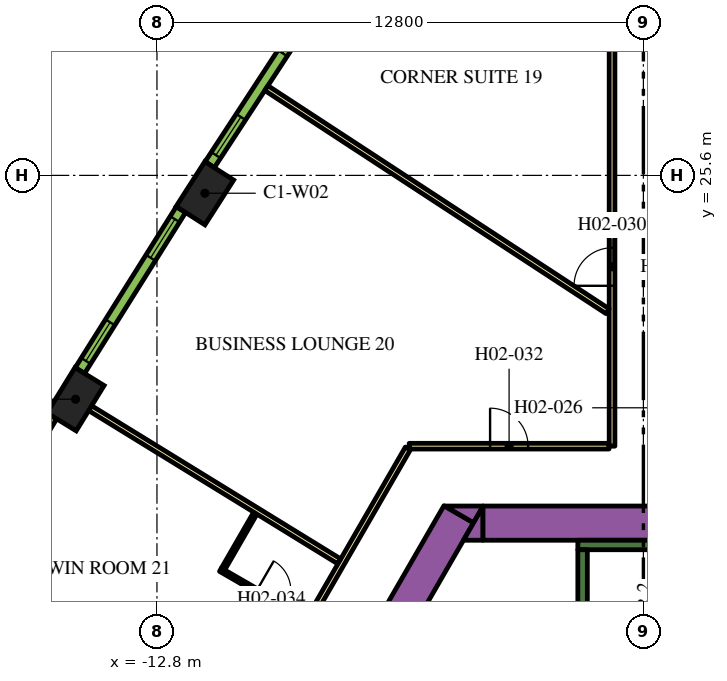
"""IFC4 building model, lengths in metres.
Left out: names, types, materials, properties, quantities, classifications, styles, units other than length and angle.
Written with IfcOpenShell. Run it as: python <this file> out.ifc"""

import sys

from ifc_helpers import new_model, si_unit, direction, frame, frame_2d, origin, origin_2d, place, context, subcontext, project, spatial, polyline, rectangle, outline, extrude, element, fill, save


model = new_model("IFC4")
c1 = context("Model", 3, precision=1e-05, world=origin(), true_north=direction((0.0, 1.0)))
c2 = subcontext(c1, "Body", "Model", "MODEL_VIEW")
j1 = project(units=[si_unit("LENGTHUNIT", "METRE"), si_unit("PLANEANGLEUNIT", "RADIAN")], contexts=[c1])
p1 = place(None, origin())
s1 = spatial("IfcSite", under=j1, at=p1, CompositionType="ELEMENT")
p2 = place(p1, origin())
s2 = spatial("IfcBuilding", under=s1, at=p2, CompositionType="ELEMENT")
p3 = place(p2, frame((0.0, 0.0, 39.3)))
s3 = spatial("IfcBuildingStorey", under=s2, at=p3, CompositionType="ELEMENT", Elevation=39.3)
for number, where, z_axis, x_axis in (
    (1, (-11.539, 25.131, 0.0), (0.0, 0.0, 1.0), (-0.539, -0.842, 0.0)),
    (2, (-14.942, 19.71, 0.0), (0.0, 0.0, 1.0), (-0.524, -0.852, 0.0)),
):
    element("IfcColumn", number, at=place(p3, frame(where, z_axis=z_axis, x_axis=x_axis)), inside=s3, PredefinedType="COLUMN", context=c2, shape_type="SweptSolid", body=[
        extrude(rectangle(XDim=1.4, YDim=0.9, at=origin_2d()), origin(), (0.0, 0.0, 1.0), 3.9),
    ])
p4 = place(p3, frame((-15.36, -1.503, 0.0), z_axis=(0.0, 0.0, 1.0), x_axis=(0.50000389221, 0.866023156604, 0.0)))
e3 = element("IfcWall", 3, at=p4, inside=s3, PredefinedType="SOLIDWALL", context=c2, shape_type="SweptSolid", body=[
    extrude(rectangle(XDim=21.0, YDim=0.9, at=frame_2d((10.5, 0.0))), origin(), (0.0, 0.0, 1.0), 3.9),
])
p5 = place(p3, origin())
e4 = element("IfcWall", 4, at=p5, inside=s3, PredefinedType="SOLIDWALL", context=c2, shape_type="SweptSolid", body=[
    extrude(outline(polyline([(-4.215, 16.9), (-4.469, 16.46), (-5.231, 16.9), (-4.215, 16.9)])), origin(), (0.0, 0.0, 1.0), 3.9),
])
p6 = place(p3, frame((-4.224, 16.45, 0.0), z_axis=(0.0, 0.0, 1.0), x_axis=(1.0, 0.0, 0.0)))
e5 = element("IfcWall", 5, at=p6, inside=s3, PredefinedType="SOLIDWALL", context=c2, shape_type="SweptSolid", body=[
    extrude(rectangle(XDim=9.488, YDim=0.9, at=frame_2d((4.744, 0.0))), origin(), (0.0, 0.0, 1.0), 3.9),
])
e6 = element("IfcWall", 6, at=p5, inside=s3, PredefinedType="SOLIDWALL", context=c2, shape_type="SweptSolid", body=[
    extrude(outline(polyline([(-4.734, 16.0), (-4.226, 16.88), (-4.226, 16.0), (-4.734, 16.0)])), origin(), (0.0, 0.0, 1.0), 3.9),
])
p7 = place(p3, frame((-1.725, 15.875, 0.0), z_axis=(0.0, 0.0, 1.0), x_axis=(1.0, 0.0, 0.0)))
e7 = element("IfcWall", 7, at=p7, inside=s3, PredefinedType="SOLIDWALL", context=c2, shape_type="SweptSolid", body=[
    extrude(rectangle(XDim=3.45, YDim=0.25, at=frame_2d((1.725, 0.0))), origin(), (0.0, 0.0, 1.0), 3.9),
])
p8 = place(p3, frame((-1.6, 8.7, 0.0), z_axis=(0.0, 0.0, 1.0), x_axis=(0.0, 1.0, 0.0)))
e8 = element("IfcWall", 8, at=p8, inside=s3, PredefinedType="SOLIDWALL", context=c2, shape_type="SweptSolid", body=[
    extrude(rectangle(XDim=7.05, YDim=0.25, at=frame_2d((3.525, 0.0))), origin(), (0.0, 0.0, 1.0), 3.9),
])
p9 = place(p3, frame((-0.825, 18.475, 0.0), z_axis=(0.0, 0.0, 1.0), x_axis=(0.0, 1.0, 0.0)))
e9 = element("IfcWall", 9, at=p9, inside=s3, PredefinedType="PARTITIONING", context=c2, shape_type="SweptSolid", body=[
    extrude(rectangle(XDim=16.224, YDim=0.15, at=frame_2d((8.112, 0.0))), origin(), (0.0, 0.0, 1.0), 2.75),
])
p10 = place(p9, frame((4.22, 0.0, 0.0)))
e10 = element("IfcOpeningElement", 10, at=p10, cuts=e9, PredefinedType="OPENING", context=c2, shape_type="SweptSolid", body=[
    extrude(rectangle(XDim=1.0, YDim=2.1, at=frame_2d((0.5, 1.05))), frame((0.0, 0.085, 0.0), z_axis=(0.0, -1.0, 0.0), x_axis=(1.0, 0.0, 0.0)), (0.0, 0.0, 1.0), 0.17),
])
p11 = place(p3, frame((-6.163, 18.475, 0.0), z_axis=(0.0, 0.0, 1.0), x_axis=(1.0, 0.0, 0.0)))
e11 = element("IfcWall", 11, at=p11, inside=s3, PredefinedType="PARTITIONING", context=c2, shape_type="SweptSolid", body=[
    extrude(rectangle(XDim=5.258, YDim=0.15, at=frame_2d((2.629, 0.0))), origin(), (0.0, 0.0, 1.0), 2.75),
])
p12 = place(p11, frame((2.129, 0.0, 0.0)))
e12 = element("IfcOpeningElement", 12, at=p12, cuts=e11, PredefinedType="OPENING", context=c2, shape_type="SweptSolid", body=[
    extrude(rectangle(XDim=1.0, YDim=2.1, at=frame_2d((0.5, 1.05))), frame((0.0, 0.085, 0.0), z_axis=(0.0, -1.0, 0.0), x_axis=(1.0, 0.0, 0.0)), (0.0, 0.0, 1.0), 0.17),
])
p13 = place(p3, frame((-19.081, -3.9, 0.0), z_axis=(0.0, 0.0, 1.0), x_axis=(0.499998313975, 0.866026377209, 0.0)))
e13 = element("IfcWall", 13, at=p13, inside=s3, PredefinedType="PARTITIONING", context=c2, shape_type="SweptSolid", body=[
    extrude(rectangle(XDim=25.766, YDim=0.15, at=frame_2d((12.883, 0.0))), origin(), (0.0, 0.0, 1.0), 2.75),
])
p14 = place(p13, frame((16.196, 0.0, 0.0)))
e14 = element("IfcOpeningElement", 14, at=p14, cuts=e13, PredefinedType="OPENING", context=c2, shape_type="SweptSolid", body=[
    extrude(rectangle(XDim=1.0, YDim=2.1, at=frame_2d((0.5, 1.05))), frame((0.0, 0.085, 0.0), z_axis=(0.0, -1.0, 0.0), x_axis=(1.0, 0.0, 0.0)), (0.0, 0.0, 1.0), 0.17),
])
p15 = place(p13, frame((14.889, 0.0, 0.0)))
e15 = element("IfcOpeningElement", 15, at=p15, cuts=e13, PredefinedType="OPENING", context=c2, shape_type="SweptSolid", body=[
    extrude(rectangle(XDim=1.0, YDim=2.1, at=frame_2d((0.5, 1.05))), frame((0.0, 0.085, 0.0), z_axis=(0.0, -1.0, 0.0), x_axis=(1.0, 0.0, 0.0)), (0.0, 0.0, 1.0), 0.17),
])
p16 = place(p13, frame((3.698, 0.0, 0.0)))
e16 = element("IfcOpeningElement", 16, at=p16, cuts=e13, PredefinedType="OPENING", context=c2, shape_type="SweptSolid", body=[
    extrude(rectangle(XDim=1.1, YDim=2.1, at=frame_2d((0.55, 1.05))), frame((0.0, 0.085, 0.0), z_axis=(0.0, -1.0, 0.0), x_axis=(1.0, 0.0, 0.0)), (0.0, 0.0, 1.0), 0.17),
])
p17 = place(p13, frame((2.392, 0.0, 0.0)))
e17 = element("IfcOpeningElement", 17, at=p17, cuts=e13, PredefinedType="OPENING", context=c2, shape_type="SweptSolid", body=[
    extrude(rectangle(XDim=1.0, YDim=2.1, at=frame_2d((0.5, 1.05))), frame((0.0, 0.085, 0.0), z_axis=(0.0, -1.0, 0.0), x_axis=(1.0, 0.0, 0.0)), (0.0, 0.0, 1.0), 0.17),
])
p18 = place(p3, frame((-14.558, 19.475, 0.0), z_axis=(0.0, 0.0, 1.0), x_axis=(0.851829455142, -0.523819223925, 0.0)))
e18 = element("IfcWall", 18, at=p18, inside=s3, PredefinedType="PARTITIONING", context=c2, shape_type="SweptSolid", body=[
    extrude(rectangle(XDim=7.688, YDim=0.15, at=frame_2d((3.844, 0.0))), origin(), (0.0, 0.0, 1.0), 2.75),
])
p19 = place(p3, frame((-9.922, 27.896, 0.0), z_axis=(0.0, 0.0, 1.0), x_axis=(0.836970816595, -0.547247523675, 0.0)))
e19 = element("IfcWall", 19, at=p19, inside=s3, PredefinedType="PARTITIONING", context=c2, shape_type="SweptSolid", body=[
    extrude(rectangle(XDim=10.729, YDim=0.15, at=frame_2d((5.364, 0.0))), origin(), (0.0, 0.0, 1.0), 2.75),
])
p20 = place(p3, frame((-11.129, 15.224, 0.0), z_axis=(0.0, 0.0, 1.0), x_axis=(0.866021400173, -0.500006934395, 0.0)))
e20 = element("IfcWall", 20, at=p20, inside=s3, PredefinedType="PARTITIONING", context=c2, shape_type="SweptSolid", body=[
    extrude(rectangle(XDim=2.6, YDim=0.1, at=frame_2d((1.3, 0.0))), origin(), (0.0, 0.0, 1.0), 2.75),
])
p21 = place(p20, frame((1.1, 0.0, 0.0)))
e21 = element("IfcOpeningElement", 21, at=p21, cuts=e20, PredefinedType="OPENING", context=c2, shape_type="SweptSolid", body=[
    extrude(rectangle(XDim=0.9, YDim=2.1, at=frame_2d((0.45, 1.05))), frame((0.0, 0.06, 0.0), z_axis=(0.0, -1.0, 0.0), x_axis=(1.0, 0.0, 0.0)), (0.0, 0.0, 1.0), 0.12),
])
p22 = place(p3, frame((-11.061, 15.242, 0.0), z_axis=(0.0, 0.0, 1.0), x_axis=(0.499976720371, 0.866038843867, 0.0)))
e22 = element("IfcWall", 22, at=p22, inside=s3, PredefinedType="PARTITIONING", context=c2, shape_type="SweptSolid", body=[
    extrude(rectangle(XDim=1.69, YDim=0.1, at=frame_2d((0.845, 0.0))), origin(), (0.0, 0.0, 1.0), 2.75),
])
p23 = place(p3, frame((-8.676, 30.068, 0.0), z_axis=(0.0, 0.0, 1.0), x_axis=(-0.547204617628, -0.836998868845, 0.0)))
e23 = element("IfcWall", 23, at=p23, inside=s3, PredefinedType="SOLIDWALL", context=c2, shape_type="SweptSolid", body=[
    extrude(rectangle(XDim=4.998, YDim=0.29, at=frame_2d((2.499, 0.0))), origin(), (0.0, 0.0, 1.0), 3.65),
])
p24 = place(p23, frame((0.297, 0.0, 0.9)))
e24 = element("IfcOpeningElement", 24, at=p24, cuts=e23, PredefinedType="OPENING", context=c2, shape_type="SweptSolid", body=[
    extrude(rectangle(XDim=1.2, YDim=2.15, at=frame_2d((0.6, 1.075))), frame((0.0, 0.155, 0.0), z_axis=(0.0, -1.0, 0.0), x_axis=(1.0, 0.0, 0.0)), (0.0, 0.0, 1.0), 0.31),
])
p25 = place(p23, frame((3.501, 0.0, 0.9)))
e25 = element("IfcOpeningElement", 25, at=p25, cuts=e23, PredefinedType="OPENING", context=c2, shape_type="SweptSolid", body=[
    extrude(rectangle(XDim=1.2, YDim=2.15, at=frame_2d((0.6, 1.075))), frame((0.0, 0.155, 0.0), z_axis=(0.0, -1.0, 0.0), x_axis=(1.0, 0.0, 0.0)), (0.0, 0.0, 1.0), 0.31),
])
p26 = place(p3, frame((-12.17, 24.699, 0.0), z_axis=(0.0, 0.0, 1.0), x_axis=(-0.531688286542, -0.846940119462, 0.0)))
e26 = element("IfcWall", 26, at=p26, inside=s3, PredefinedType="SOLIDWALL", context=c2, shape_type="SweptSolid", body=[
    extrude(rectangle(XDim=4.998, YDim=0.29, at=frame_2d((2.499, 0.0))), origin(), (0.0, 0.0, 1.0), 3.65),
])
p27 = place(p26, frame((0.297, 0.0, 0.9)))
e27 = element("IfcOpeningElement", 27, at=p27, cuts=e26, PredefinedType="OPENING", context=c2, shape_type="SweptSolid", body=[
    extrude(rectangle(XDim=1.2, YDim=2.15, at=frame_2d((0.6, 1.075))), frame((0.0, 0.155, 0.0), z_axis=(0.0, -1.0, 0.0), x_axis=(1.0, 0.0, 0.0)), (0.0, 0.0, 1.0), 0.31),
])
p28 = place(p26, frame((3.501, 0.0, 0.9)))
e28 = element("IfcOpeningElement", 28, at=p28, cuts=e26, PredefinedType="OPENING", context=c2, shape_type="SweptSolid", body=[
    extrude(rectangle(XDim=1.2, YDim=2.15, at=frame_2d((0.6, 1.075))), frame((0.0, 0.155, 0.0), z_axis=(0.0, -1.0, 0.0), x_axis=(1.0, 0.0, 0.0)), (0.0, 0.0, 1.0), 0.31),
])
p29 = place(p3, frame((-15.564, 19.267, 0.0), z_axis=(0.0, 0.0, 1.0), x_axis=(-0.515938796285, -0.856625448191, 0.0)))
e29 = element("IfcWall", 29, at=p29, inside=s3, PredefinedType="SOLIDWALL", context=c2, shape_type="SweptSolid", body=[
    extrude(rectangle(XDim=4.998, YDim=0.29, at=frame_2d((2.499, 0.0))), origin(), (0.0, 0.0, 1.0), 3.65),
])
p30 = place(p29, frame((0.297, 0.0, 0.9)))
e30 = element("IfcOpeningElement", 30, at=p30, cuts=e29, PredefinedType="OPENING", context=c2, shape_type="SweptSolid", body=[
    extrude(rectangle(XDim=1.2, YDim=2.15, at=frame_2d((0.6, 1.075))), frame((0.0, 0.155, 0.0), z_axis=(0.0, -1.0, 0.0), x_axis=(1.0, 0.0, 0.0)), (0.0, 0.0, 1.0), 0.31),
])
p31 = place(p29, frame((3.501, 0.0, 0.9)))
e31 = element("IfcOpeningElement", 31, at=p31, cuts=e29, PredefinedType="OPENING", context=c2, shape_type="SweptSolid", body=[
    extrude(rectangle(XDim=1.2, YDim=2.15, at=frame_2d((0.6, 1.075))), frame((0.0, 0.155, 0.0), z_axis=(0.0, -1.0, 0.0), x_axis=(1.0, 0.0, 0.0)), (0.0, 0.0, 1.0), 0.31),
])
p32 = place(p10, origin())
e32 = element("IfcDoor", 32, at=p32, inside=s3, OperationType="SINGLE_SWING_LEFT", PredefinedType="DOOR", context=c2, shape_type="SweptSolid", body=[
    extrude(rectangle(XDim=1.0, YDim=2.1, at=frame_2d((0.5, 1.05))), frame((0.0, 0.025, 0.0), z_axis=(0.0, -1.0, 0.0), x_axis=(1.0, 0.0, 0.0)), (0.0, 0.0, 1.0), 0.05),
])
fill(e10, e32)
p33 = place(p12, origin())
e33 = element("IfcDoor", 33, at=p33, inside=s3, OperationType="SINGLE_SWING_RIGHT", PredefinedType="DOOR", context=c2, shape_type="SweptSolid", body=[
    extrude(rectangle(XDim=1.0, YDim=2.1, at=frame_2d((0.5, 1.05))), frame((0.0, 0.025, 0.0), z_axis=(0.0, -1.0, 0.0), x_axis=(1.0, 0.0, 0.0)), (0.0, 0.0, 1.0), 0.05),
])
fill(e12, e33)
p34 = place(p21, origin())
e34 = element("IfcDoor", 34, at=p34, inside=s3, OperationType="SINGLE_SWING_RIGHT", PredefinedType="DOOR", context=c2, shape_type="SweptSolid", body=[
    extrude(rectangle(XDim=0.9, YDim=2.1, at=frame_2d((0.45, 1.05))), frame((0.0, 0.025, 0.0), z_axis=(0.0, -1.0, 0.0), x_axis=(1.0, 0.0, 0.0)), (0.0, 0.0, 1.0), 0.05),
])
fill(e21, e34)
p35 = place(p24, origin())
e35 = element("IfcWindow", 35, at=p35, inside=s3, PartitioningType="DOUBLE_PANEL_VERTICAL", PredefinedType="WINDOW", context=c2, shape_type="SweptSolid", body=[
    extrude(rectangle(XDim=1.2, YDim=2.15, at=frame_2d((0.6, 1.075))), frame((0.0, 0.015, 0.0), z_axis=(0.0, -1.0, 0.0), x_axis=(1.0, 0.0, 0.0)), (0.0, 0.0, 1.0), 0.06),
])
fill(e24, e35)
p36 = place(p25, origin())
e36 = element("IfcWindow", 36, at=p36, inside=s3, PartitioningType="DOUBLE_PANEL_VERTICAL", PredefinedType="WINDOW", context=c2, shape_type="SweptSolid", body=[
    extrude(rectangle(XDim=1.2, YDim=2.15, at=frame_2d((0.6, 1.075))), frame((0.0, 0.015, 0.0), z_axis=(0.0, -1.0, 0.0), x_axis=(1.0, 0.0, 0.0)), (0.0, 0.0, 1.0), 0.06),
])
fill(e25, e36)
p37 = place(p27, origin())
e37 = element("IfcWindow", 37, at=p37, inside=s3, PartitioningType="DOUBLE_PANEL_VERTICAL", PredefinedType="WINDOW", context=c2, shape_type="SweptSolid", body=[
    extrude(rectangle(XDim=1.2, YDim=2.15, at=frame_2d((0.6, 1.075))), frame((0.0, 0.015, 0.0), z_axis=(0.0, -1.0, 0.0), x_axis=(1.0, 0.0, 0.0)), (0.0, 0.0, 1.0), 0.06),
])
fill(e27, e37)
p38 = place(p28, origin())
e38 = element("IfcWindow", 38, at=p38, inside=s3, PartitioningType="DOUBLE_PANEL_VERTICAL", PredefinedType="WINDOW", context=c2, shape_type="SweptSolid", body=[
    extrude(rectangle(XDim=1.2, YDim=2.15, at=frame_2d((0.6, 1.075))), frame((0.0, 0.015, 0.0), z_axis=(0.0, -1.0, 0.0), x_axis=(1.0, 0.0, 0.0)), (0.0, 0.0, 1.0), 0.06),
])
fill(e28, e38)
save(model, sys.argv[1])
